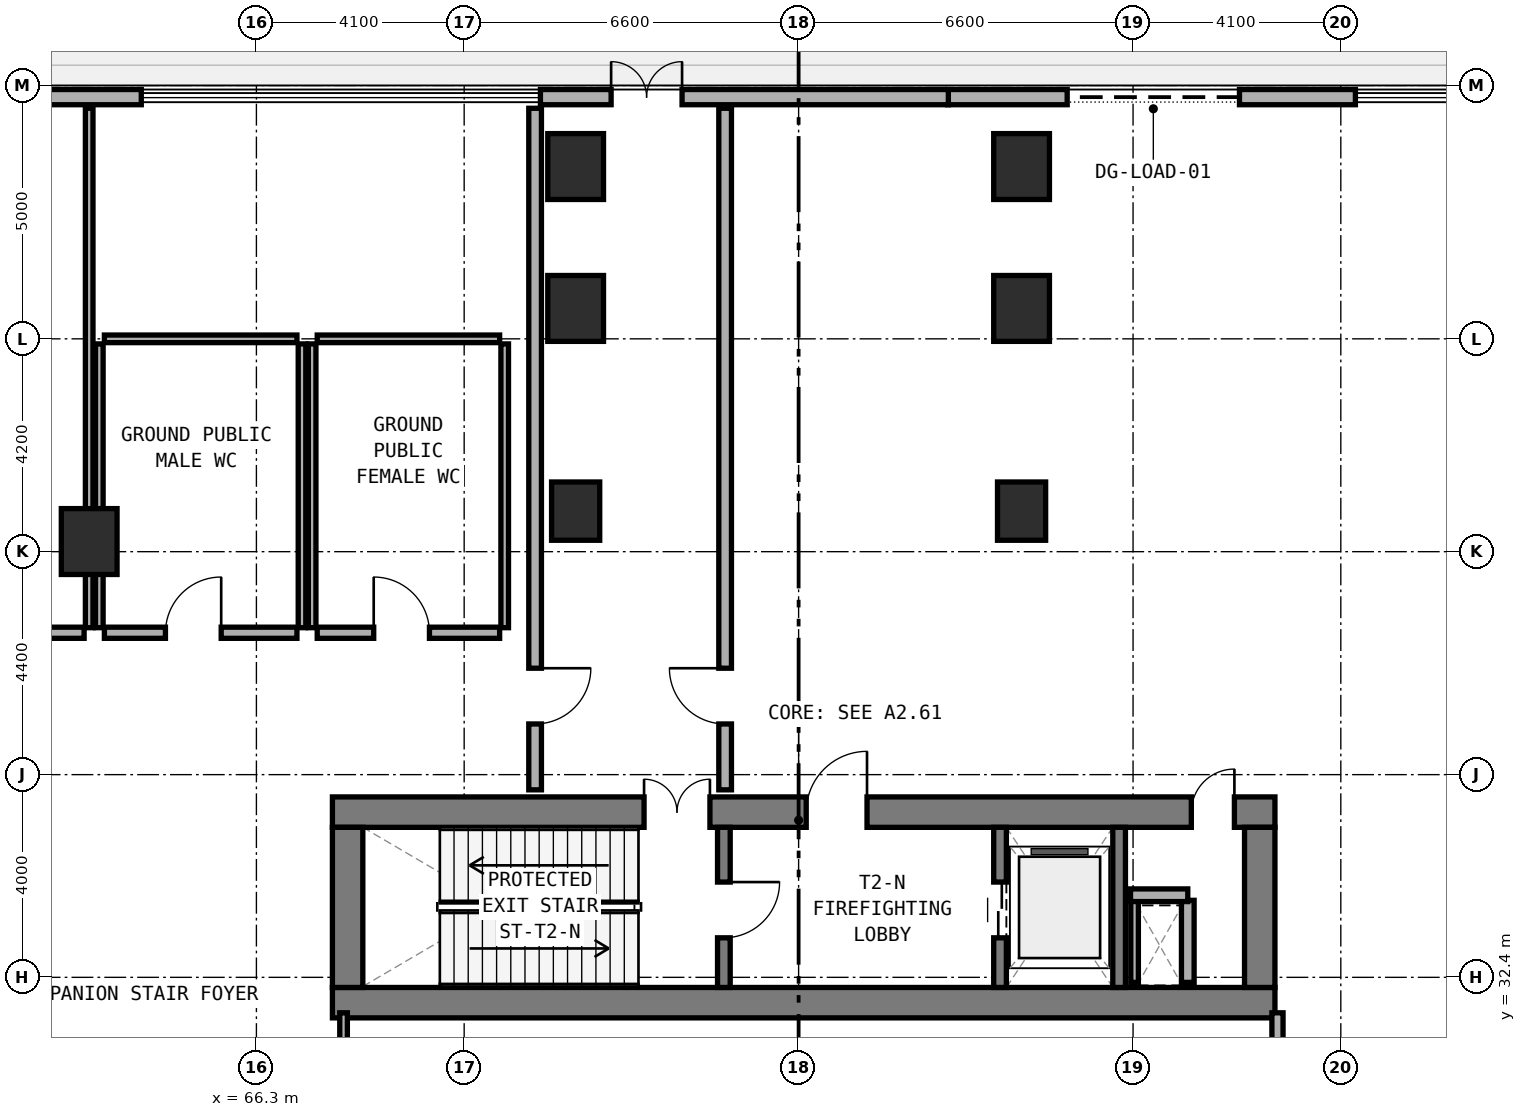
"""IFC4 building model, lengths in metres.
Left out: names, types, materials, properties, quantities, classifications, styles, units other than length and angle.
Written with IfcOpenShell. Run it as: python <this file> out.ifc"""

import sys

from ifc_helpers import new_model, si_unit, direction, frame, frame_2d, origin, origin_2d, place, context, subcontext, project, spatial, rectangle, extrude, element, fill, save


model = new_model("IFC4")
c1 = context("Model", 3, precision=1e-05, world=origin(), true_north=direction((0.0, 1.0)))
c2 = subcontext(c1, "Body", "Model", "MODEL_VIEW")
j1 = project(units=[si_unit("LENGTHUNIT", "METRE"), si_unit("PLANEANGLEUNIT", "RADIAN")], contexts=[c1])
p1 = place(None, origin())
s1 = spatial("IfcSite", under=j1, at=p1, CompositionType="ELEMENT")
p2 = place(p1, origin())
s2 = spatial("IfcBuilding", under=s1, at=p2, CompositionType="ELEMENT")
p3 = place(p2, origin())
s3 = spatial("IfcBuildingStorey", under=s2, at=p3, CompositionType="ELEMENT", Elevation=0.0)
p4 = place(p3, frame((67.8, 31.9, 0.0), z_axis=(0.0, 0.0, 1.0), x_axis=(1.0, 0.0, 0.0)))
e1 = element("IfcWall", 1, at=p4, inside=s3, PredefinedType="SHEAR", context=c2, shape_type="SweptSolid", body=[
    extrude(rectangle(XDim=18.6, YDim=0.6, at=frame_2d((9.3, 0.0))), origin(), (0.0, 0.0, 1.0), 5.4),
])
p5 = place(p3, frame((67.8, 35.66, 0.0), z_axis=(0.0, 0.0, 1.0), x_axis=(1.0, 0.0, 0.0)))
e2 = element("IfcWall", 2, at=p5, inside=s3, PredefinedType="SHEAR", context=c2, shape_type="SweptSolid", body=[
    extrude(rectangle(XDim=18.6, YDim=0.6, at=frame_2d((9.3, 0.0))), origin(), (0.0, 0.0, 1.0), 5.4),
])
p6 = place(p5, frame((9.35, 0.0, 0.0)))
e3 = element("IfcOpeningElement", 3, at=p6, cuts=e2, PredefinedType="OPENING", context=c2, shape_type="SweptSolid", body=[
    extrude(rectangle(XDim=1.2, YDim=2.15, at=frame_2d((0.6, 1.075))), frame((0.0, 0.31, 0.0), z_axis=(0.0, -1.0, 0.0), x_axis=(1.0, 0.0, 0.0)), (0.0, 0.0, 1.0), 0.62),
])
p7 = place(p5, frame((6.15, 0.0, 0.0)))
e4 = element("IfcOpeningElement", 4, at=p7, cuts=e2, PredefinedType="OPENING", context=c2, shape_type="SweptSolid", body=[
    extrude(rectangle(XDim=1.3, YDim=2.15, at=frame_2d((0.65, 1.075))), frame((0.0, 0.31, 0.0), z_axis=(0.0, -1.0, 0.0), x_axis=(1.0, 0.0, 0.0)), (0.0, 0.0, 1.0), 0.62),
])
p8 = place(p5, frame((16.95, 0.0, 0.0)))
e5 = element("IfcOpeningElement", 5, at=p8, cuts=e2, PredefinedType="OPENING", context=c2, shape_type="SweptSolid", body=[
    extrude(rectangle(XDim=0.85, YDim=2.1, at=frame_2d((0.425, 1.05))), frame((0.0, 0.31, 0.0), z_axis=(0.0, -1.0, 0.0), x_axis=(1.0, 0.0, 0.0)), (0.0, 0.0, 1.0), 0.62),
])
for number, where, z_axis, x_axis in (
    (6, (68.1, 32.2, 0.0), (0.0, 0.0, 1.0), (0.0, 1.0, 0.0)),
    (7, (86.1, 32.2, 0.0), (0.0, 0.0, 1.0), (0.0, 1.0, 0.0)),
):
    element("IfcWall", number, at=place(p3, frame(where, z_axis=z_axis, x_axis=x_axis)), inside=s3, PredefinedType="SHEAR", context=c2, shape_type="SweptSolid", body=[
        extrude(rectangle(XDim=3.16, YDim=0.6, at=frame_2d((1.58, 0.0))), origin(), (0.0, 0.0, 1.0), 5.4),
    ])
p9 = place(p3, frame((75.525, 32.2, 0.0), z_axis=(0.0, 0.0, 1.0), x_axis=(0.0, 1.0, 0.0)))
e8 = element("IfcWall", 8, at=p9, inside=s3, PredefinedType="STANDARD", context=c2, shape_type="SweptSolid", body=[
    extrude(rectangle(XDim=3.16, YDim=0.25, at=frame_2d((1.58, 0.0))), origin(), (0.0, 0.0, 1.0), 5.05),
])
p10 = place(p9, frame((0.98, 0.0, 0.0)))
e9 = element("IfcOpeningElement", 9, at=p10, cuts=e8, PredefinedType="OPENING", context=c2, shape_type="SweptSolid", body=[
    extrude(rectangle(XDim=1.1, YDim=2.15, at=frame_2d((0.55, 1.075))), frame((0.0, 0.135, 0.0), z_axis=(0.0, -1.0, 0.0), x_axis=(1.0, 0.0, 0.0)), (0.0, 0.0, 1.0), 0.27),
])
p11 = place(p3, frame((80.975, 32.2, 0.0), z_axis=(0.0, 0.0, 1.0), x_axis=(0.0, 1.0, 0.0)))
e10 = element("IfcWall", 10, at=p11, inside=s3, PredefinedType="STANDARD", context=c2, shape_type="SweptSolid", body=[
    extrude(rectangle(XDim=3.16, YDim=0.25, at=frame_2d((1.58, 0.0))), origin(), (0.0, 0.0, 1.0), 5.05),
])
p12 = place(p11, frame((0.98, 0.0, 0.0)))
e11 = element("IfcOpeningElement", 11, at=p12, cuts=e10, PredefinedType="OPENING", context=c2, shape_type="SweptSolid", body=[
    extrude(rectangle(XDim=1.1, YDim=2.15, at=frame_2d((0.55, 1.075))), frame((0.0, 0.135, 0.0), z_axis=(0.0, -1.0, 0.0), x_axis=(1.0, 0.0, 0.0)), (0.0, 0.0, 1.0), 0.27),
])
p13 = place(p3, frame((83.325, 32.2, 0.0), z_axis=(0.0, 0.0, 1.0), x_axis=(0.0, 1.0, 0.0)))
e12 = element("IfcWall", 12, at=p13, inside=s3, PredefinedType="STANDARD", context=c2, shape_type="SweptSolid", body=[
    extrude(rectangle(XDim=3.16, YDim=0.25, at=frame_2d((1.58, 0.0))), origin(), (0.0, 0.0, 1.0), 5.05),
])
for number, where, z_axis, x_axis in (
    (13, (72.6, 41.6, 0.0), (0.0, 0.0, 1.0), (1.0, 0.0, 0.0)),
    (14, (81.4, 41.6, 0.0), (0.0, 0.0, 1.0), (1.0, 0.0, 0.0)),
):
    element("IfcColumn", number, at=place(p3, frame(where, z_axis=z_axis, x_axis=x_axis)), inside=s3, PredefinedType="COLUMN", context=c2, shape_type="SweptSolid", body=[
        extrude(rectangle(XDim=0.95, YDim=1.15, at=origin_2d()), origin(), (0.0, 0.0, 1.0), 5.4),
    ])
for number, where, z_axis, x_axis in (
    (15, (63.0, 41.0, 0.0), (0.0, 0.0, 1.0), (1.0, 0.0, 0.0)),
    (16, (72.6, 48.4, 0.0), (0.0, 0.0, 1.0), (1.0, 0.0, 0.0)),
    (17, (81.4, 48.4, 0.0), (0.0, 0.0, 1.0), (1.0, 0.0, 0.0)),
    (18, (72.6, 45.6, 0.0), (0.0, 0.0, 1.0), (1.0, 0.0, 0.0)),
    (19, (81.4, 45.6, 0.0), (0.0, 0.0, 1.0), (1.0, 0.0, 0.0)),
):
    element("IfcColumn", number, at=place(p3, frame(where, z_axis=z_axis, x_axis=x_axis)), inside=s3, PredefinedType="COLUMN", context=c2, shape_type="SweptSolid", body=[
        extrude(rectangle(XDim=1.1, YDim=1.3, at=origin_2d()), origin(), (0.0, 0.0, 1.0), 5.4),
    ])
p14 = place(p3, frame((87.988, 49.77, 0.0), z_axis=(0.0, 0.0, 1.0), x_axis=(-1.0, 0.0, 0.0)))
e20 = element("IfcWall", 20, at=p14, inside=s3, PredefinedType="STANDARD", context=c2, shape_type="SweptSolid", body=[
    extrude(rectangle(XDim=8.049, YDim=0.3, at=frame_2d((4.024, 0.0))), origin(), (0.0, 0.0, 1.0), 5.05),
])
p15 = place(p14, frame((2.288, 0.0, 0.0)))
e21 = element("IfcOpeningElement", 21, at=p15, cuts=e20, PredefinedType="OPENING", context=c2, shape_type="SweptSolid", body=[
    extrude(rectangle(XDim=3.4, YDim=3.2, at=frame_2d((1.7, 1.6))), frame((0.0, 0.16, 0.0), z_axis=(0.0, -1.0, 0.0), x_axis=(1.0, 0.0, 0.0)), (0.0, 0.0, 1.0), 0.32),
])
p16 = place(p3, frame((79.955, 49.77, 0.0), z_axis=(0.0, 0.0, 1.0), x_axis=(-1.0, 0.0, 0.0)))
e22 = element("IfcWall", 22, at=p16, inside=s3, PredefinedType="STANDARD", context=c2, shape_type="SweptSolid", body=[
    extrude(rectangle(XDim=8.05, YDim=0.3, at=frame_2d((4.025, 0.0))), origin(), (0.0, 0.0, 1.0), 5.05),
])
p17 = place(p16, frame((5.255, 0.0, 0.0)))
e23 = element("IfcOpeningElement", 23, at=p17, cuts=e22, PredefinedType="OPENING", context=c2, shape_type="SweptSolid", body=[
    extrude(rectangle(XDim=1.4, YDim=2.2, at=frame_2d((0.7, 1.1))), frame((0.0, 0.16, 0.0), z_axis=(0.0, -1.0, 0.0), x_axis=(1.0, 0.0, 0.0)), (0.0, 0.0, 1.0), 0.32),
])
p18 = place(p3, frame((64.028, 49.77, 0.0), z_axis=(0.0, 0.0, 1.0), x_axis=(-1.0, 0.0, 0.0)))
e24 = element("IfcWall", 24, at=p18, inside=s3, PredefinedType="STANDARD", context=c2, shape_type="SweptSolid", body=[
    extrude(rectangle(XDim=8.049, YDim=0.3, at=frame_2d((4.024, 0.0))), origin(), (0.0, 0.0, 1.0), 5.05),
])
p19 = place(p18, frame((2.328, 0.0, 0.0)))
e25 = element("IfcOpeningElement", 25, at=p19, cuts=e24, PredefinedType="OPENING", context=c2, shape_type="SweptSolid", body=[
    extrude(rectangle(XDim=3.4, YDim=3.2, at=frame_2d((1.7, 1.6))), frame((0.0, 0.16, 0.0), z_axis=(0.0, -1.0, 0.0), x_axis=(1.0, 0.0, 0.0)), (0.0, 0.0, 1.0), 0.32),
])
p20 = place(p3, frame((83.63, 32.3, 0.0), z_axis=(0.0, 0.0, 1.0), x_axis=(0.0, 1.0, 0.0)))
e26 = element("IfcWall", 26, at=p20, inside=s3, PredefinedType="PARTITIONING", context=c2, shape_type="SweptSolid", body=[
    extrude(rectangle(XDim=1.62, YDim=0.15, at=frame_2d((0.81, 0.0))), origin(), (0.0, 0.0, 1.0), 4.525),
])
p21 = place(p3, frame((84.68, 32.3, 0.0), z_axis=(0.0, 0.0, 1.0), x_axis=(0.0, 1.0, 0.0)))
e27 = element("IfcWall", 27, at=p21, inside=s3, PredefinedType="SOLIDWALL", context=c2, shape_type="SweptSolid", body=[
    extrude(rectangle(XDim=1.62, YDim=0.25, at=frame_2d((0.81, 0.0))), origin(), (0.0, 0.0, 1.0), 5.05),
])
p22 = place(p3, frame((83.55, 34.02, 0.0), z_axis=(0.0, 0.0, 1.0), x_axis=(1.0, 0.0, 0.0)))
e28 = element("IfcWall", 28, at=p22, inside=s3, PredefinedType="SOLIDWALL", context=c2, shape_type="SweptSolid", body=[
    extrude(rectangle(XDim=1.13, YDim=0.25, at=frame_2d((0.565, 0.0))), origin(), (0.0, 0.0, 1.0), 5.05),
])
p23 = place(p3, frame((71.8, 36.1, 0.0), z_axis=(0.0, 0.0, 1.0), x_axis=(0.0, 1.0, 0.0)))
e29 = element("IfcWall", 29, at=p23, inside=s3, PredefinedType="SOLIDWALL", context=c2, shape_type="SweptSolid", body=[
    extrude(rectangle(XDim=13.45, YDim=0.25, at=frame_2d((6.725, 0.0))), origin(), (0.0, 0.0, 1.0), 4.225),
])
p24 = place(p23, frame((1.3, 0.0, 0.0)))
e30 = element("IfcOpeningElement", 30, at=p24, cuts=e29, PredefinedType="OPENING", context=c2, shape_type="SweptSolid", body=[
    extrude(rectangle(XDim=1.1, YDim=2.15, at=frame_2d((0.55, 1.075))), frame((0.0, 0.135, 0.0), z_axis=(0.0, -1.0, 0.0), x_axis=(1.0, 0.0, 0.0)), (0.0, 0.0, 1.0), 0.27),
])
p25 = place(p3, frame((75.55, 36.1, 0.0), z_axis=(0.0, 0.0, 1.0), x_axis=(0.0, 1.0, 0.0)))
e31 = element("IfcWall", 31, at=p25, inside=s3, PredefinedType="SOLIDWALL", context=c2, shape_type="SweptSolid", body=[
    extrude(rectangle(XDim=13.45, YDim=0.25, at=frame_2d((6.725, 0.0))), origin(), (0.0, 0.0, 1.0), 4.425),
])
p26 = place(p25, frame((1.3, 0.0, 0.0)))
e32 = element("IfcOpeningElement", 32, at=p26, cuts=e31, PredefinedType="OPENING", context=c2, shape_type="SweptSolid", body=[
    extrude(rectangle(XDim=1.1, YDim=2.15, at=frame_2d((0.55, 1.075))), frame((0.0, 0.135, 0.0), z_axis=(0.0, -1.0, 0.0), x_axis=(1.0, 0.0, 0.0)), (0.0, 0.0, 1.0), 0.27),
])
p27 = place(p3, frame((68.02, 18.3, 0.0), z_axis=(0.0, 0.0, 1.0), x_axis=(0.0, 1.0, 0.0)))
e33 = element("IfcWall", 33, at=p27, inside=s3, PredefinedType="PARTITIONING", context=c2, shape_type="SweptSolid", body=[
    extrude(rectangle(XDim=13.4, YDim=0.15, at=frame_2d((6.7, 0.0))), origin(), (0.0, 0.0, 1.0), 4.525),
])
p28 = place(p3, frame((86.45, 18.3, 0.0), z_axis=(0.0, 0.0, 1.0), x_axis=(0.0, 1.0, 0.0)))
e34 = element("IfcWall", 34, at=p28, inside=s3, PredefinedType="SOLIDWALL", context=c2, shape_type="SweptSolid", body=[
    extrude(rectangle(XDim=13.4, YDim=0.22, at=frame_2d((6.7, 0.0))), origin(), (0.0, 0.0, 1.0), 4.525),
])
p29 = place(p28, frame((5.525, 0.0, 0.0)))
e35 = element("IfcOpeningElement", 35, at=p29, cuts=e34, PredefinedType="OPENING", context=c2, shape_type="SweptSolid", body=[
    extrude(rectangle(XDim=1.1, YDim=2.1, at=frame_2d((0.55, 1.05))), frame((0.0, 0.12, 0.0), z_axis=(0.0, -1.0, 0.0), x_axis=(1.0, 0.0, 0.0)), (0.0, 0.0, 1.0), 0.24),
])
for number, where, z_axis, x_axis in (
    (36, (63.2, 39.3, 0.0), (0.0, 0.0, 1.0), (0.0, 1.0, 0.0)),
    (37, (67.2, 39.3, 0.0), (0.0, 0.0, 1.0), (0.0, 1.0, 0.0)),
):
    element("IfcWall", number, at=place(p3, frame(where, z_axis=z_axis, x_axis=x_axis)), inside=s3, PredefinedType="PARTITIONING", context=c2, shape_type="SweptSolid", body=[
        extrude(rectangle(XDim=5.6, YDim=0.15, at=frame_2d((2.8, 0.0))), origin(), (0.0, 0.0, 1.0), 4.665),
    ])
p30 = place(p3, frame((63.3, 45.0, 0.0), z_axis=(0.0, 0.0, 1.0), x_axis=(1.0, 0.0, 0.0)))
e38 = element("IfcWall", 38, at=p30, inside=s3, PredefinedType="PARTITIONING", context=c2, shape_type="SweptSolid", body=[
    extrude(rectangle(XDim=3.8, YDim=0.15, at=frame_2d((1.9, 0.0))), origin(), (0.0, 0.0, 1.0), 5.05),
])
p31 = place(p3, frame((63.3, 39.2, 0.0), z_axis=(0.0, 0.0, 1.0), x_axis=(1.0, 0.0, 0.0)))
e39 = element("IfcWall", 39, at=p31, inside=s3, PredefinedType="SOLIDWALL", context=c2, shape_type="SweptSolid", body=[
    extrude(rectangle(XDim=3.8, YDim=0.22, at=frame_2d((1.9, 0.0))), origin(), (0.0, 0.0, 1.0), 5.05),
])
p32 = place(p31, frame((1.205, 0.0, 0.0)))
e40 = element("IfcOpeningElement", 40, at=p32, cuts=e39, PredefinedType="OPENING", context=c2, shape_type="SweptSolid", body=[
    extrude(rectangle(XDim=1.1, YDim=2.1, at=frame_2d((0.55, 1.05))), frame((0.0, 0.12, 0.0), z_axis=(0.0, -1.0, 0.0), x_axis=(1.0, 0.0, 0.0)), (0.0, 0.0, 1.0), 0.24),
])
for number, where, z_axis, x_axis in (
    (41, (67.4, 39.3, 0.0), (0.0, 0.0, 1.0), (0.0, 1.0, 0.0)),
    (42, (71.2, 39.3, 0.0), (0.0, 0.0, 1.0), (0.0, 1.0, 0.0)),
):
    element("IfcWall", number, at=place(p3, frame(where, z_axis=z_axis, x_axis=x_axis)), inside=s3, PredefinedType="PARTITIONING", context=c2, shape_type="SweptSolid", body=[
        extrude(rectangle(XDim=5.6, YDim=0.15, at=frame_2d((2.8, 0.0))), origin(), (0.0, 0.0, 1.0), 4.665),
    ])
p33 = place(p3, frame((67.5, 45.0, 0.0), z_axis=(0.0, 0.0, 1.0), x_axis=(1.0, 0.0, 0.0)))
e43 = element("IfcWall", 43, at=p33, inside=s3, PredefinedType="PARTITIONING", context=c2, shape_type="SweptSolid", body=[
    extrude(rectangle(XDim=3.6, YDim=0.15, at=frame_2d((1.8, 0.0))), origin(), (0.0, 0.0, 1.0), 5.05),
])
p34 = place(p3, frame((67.5, 39.2, 0.0), z_axis=(0.0, 0.0, 1.0), x_axis=(1.0, 0.0, 0.0)))
e44 = element("IfcWall", 44, at=p34, inside=s3, PredefinedType="SOLIDWALL", context=c2, shape_type="SweptSolid", body=[
    extrude(rectangle(XDim=3.6, YDim=0.22, at=frame_2d((1.8, 0.0))), origin(), (0.0, 0.0, 1.0), 5.05),
])
p35 = place(p34, frame((1.115, 0.0, 0.0)))
e45 = element("IfcOpeningElement", 45, at=p35, cuts=e44, PredefinedType="OPENING", context=c2, shape_type="SweptSolid", body=[
    extrude(rectangle(XDim=1.1, YDim=2.1, at=frame_2d((0.55, 1.05))), frame((0.0, 0.12, 0.0), z_axis=(0.0, -1.0, 0.0), x_axis=(1.0, 0.0, 0.0)), (0.0, 0.0, 1.0), 0.24),
])
p36 = place(p3, frame((63.0, 39.3, 0.0), z_axis=(0.0, 0.0, 1.0), x_axis=(0.0, 1.0, 0.0)))
e46 = element("IfcWall", 46, at=p36, inside=s3, PredefinedType="PARTITIONING", context=c2, shape_type="SweptSolid", body=[
    extrude(rectangle(XDim=10.25, YDim=0.15, at=frame_2d((5.125, 0.0))), origin(), (0.0, 0.0, 1.0), 4.225),
])
p37 = place(p3, frame((30.5, 39.2, 0.0), z_axis=(0.0, 0.0, 1.0), x_axis=(1.0, 0.0, 0.0)))
e47 = element("IfcWall", 47, at=p37, inside=s3, PredefinedType="SOLIDWALL", context=c2, shape_type="SweptSolid", body=[
    extrude(rectangle(XDim=32.4, YDim=0.22, at=frame_2d((16.2, 0.0))), origin(), (0.0, 0.0, 1.0), 4.325),
])
p38 = place(p37, frame((14.075, 0.0, 0.0)))
e48 = element("IfcOpeningElement", 48, at=p38, cuts=e47, PredefinedType="OPENING", context=c2, shape_type="SweptSolid", body=[
    extrude(rectangle(XDim=1.1, YDim=2.1, at=frame_2d((0.55, 1.05))), frame((0.0, 0.12, 0.0), z_axis=(0.0, -1.0, 0.0), x_axis=(1.0, 0.0, 0.0)), (0.0, 0.0, 1.0), 0.24),
])
p39 = place(p15, frame((3.4, 0.0, 0.0), z_axis=(0.0, 0.0, 1.0), x_axis=(-1.0, 0.0, 0.0)))
e49 = element("IfcDoor", 49, at=p39, inside=s3, OperationType="ROLLINGUP", PredefinedType="GATE", context=c2, shape_type="SweptSolid", body=[
    extrude(rectangle(XDim=3.4, YDim=3.2, at=frame_2d((1.7, 1.6))), frame((0.0, 0.025, 0.0), z_axis=(0.0, -1.0, 0.0), x_axis=(1.0, 0.0, 0.0)), (0.0, 0.0, 1.0), 0.05),
])
fill(e21, e49)
p40 = place(p17, frame((1.4, 0.0, 0.0), z_axis=(0.0, 0.0, 1.0), x_axis=(-1.0, 0.0, 0.0)))
e50 = element("IfcDoor", 50, at=p40, inside=s3, OperationType="DOUBLE_DOOR_SINGLE_SWING", PredefinedType="DOOR", context=c2, shape_type="SweptSolid", body=[
    extrude(rectangle(XDim=1.4, YDim=2.2, at=frame_2d((0.7, 1.1))), frame((0.0, 0.025, 0.0), z_axis=(0.0, -1.0, 0.0), x_axis=(1.0, 0.0, 0.0)), (0.0, 0.0, 1.0), 0.05),
])
fill(e23, e50)
p41 = place(p10, frame((1.1, 0.0, 0.0), z_axis=(0.0, 0.0, 1.0), x_axis=(-1.0, 0.0, 0.0)))
e51 = element("IfcDoor", 51, at=p41, inside=s3, OperationType="SINGLE_SWING_LEFT", PredefinedType="DOOR", context=c2, shape_type="SweptSolid", body=[
    extrude(rectangle(XDim=1.1, YDim=2.15, at=frame_2d((0.55, 1.075))), frame((0.0, 0.025, 0.0), z_axis=(0.0, -1.0, 0.0), x_axis=(1.0, 0.0, 0.0)), (0.0, 0.0, 1.0), 0.05),
])
fill(e9, e51)
p42 = place(p6, origin())
e52 = element("IfcDoor", 52, at=p42, inside=s3, OperationType="SINGLE_SWING_RIGHT", PredefinedType="DOOR", context=c2, shape_type="SweptSolid", body=[
    extrude(rectangle(XDim=1.2, YDim=2.15, at=frame_2d((0.6, 1.075))), frame((0.0, 0.025, 0.0), z_axis=(0.0, -1.0, 0.0), x_axis=(1.0, 0.0, 0.0)), (0.0, 0.0, 1.0), 0.05),
])
fill(e3, e52)
p43 = place(p7, origin())
e53 = element("IfcDoor", 53, at=p43, inside=s3, OperationType="DOUBLE_DOOR_SINGLE_SWING", PredefinedType="DOOR", context=c2, shape_type="SweptSolid", body=[
    extrude(rectangle(XDim=1.3, YDim=2.15, at=frame_2d((0.65, 1.075))), frame((0.0, 0.025, 0.0), z_axis=(0.0, -1.0, 0.0), x_axis=(1.0, 0.0, 0.0)), (0.0, 0.0, 1.0), 0.05),
])
fill(e4, e53)
p44 = place(p12, origin())
e54 = element("IfcDoor", 54, at=p44, inside=s3, OperationType="DOUBLE_DOOR_SLIDING", PredefinedType="DOOR", context=c2, shape_type="SweptSolid", body=[
    extrude(rectangle(XDim=1.1, YDim=2.15, at=frame_2d((0.55, 1.075))), frame((0.0, 0.025, 0.0), z_axis=(0.0, -1.0, 0.0), x_axis=(1.0, 0.0, 0.0)), (0.0, 0.0, 1.0), 0.05),
])
fill(e11, e54)
p45 = place(p8, origin())
e55 = element("IfcDoor", 55, at=p45, inside=s3, OperationType="SINGLE_SWING_RIGHT", PredefinedType="DOOR", context=c2, shape_type="SweptSolid", body=[
    extrude(rectangle(XDim=0.85, YDim=2.1, at=frame_2d((0.425, 1.05))), frame((0.0, 0.025, 0.0), z_axis=(0.0, -1.0, 0.0), x_axis=(1.0, 0.0, 0.0)), (0.0, 0.0, 1.0), 0.05),
])
fill(e5, e55)
p46 = place(p24, frame((1.1, 0.0, 0.0), z_axis=(0.0, 0.0, 1.0), x_axis=(-1.0, 0.0, 0.0)))
e56 = element("IfcDoor", 56, at=p46, inside=s3, OperationType="SINGLE_SWING_LEFT", PredefinedType="DOOR", context=c2, shape_type="SweptSolid", body=[
    extrude(rectangle(XDim=1.1, YDim=2.15, at=frame_2d((0.55, 1.075))), frame((0.0, 0.025, 0.0), z_axis=(0.0, -1.0, 0.0), x_axis=(1.0, 0.0, 0.0)), (0.0, 0.0, 1.0), 0.05),
])
fill(e30, e56)
p47 = place(p26, origin())
e57 = element("IfcDoor", 57, at=p47, inside=s3, OperationType="SINGLE_SWING_RIGHT", PredefinedType="DOOR", context=c2, shape_type="SweptSolid", body=[
    extrude(rectangle(XDim=1.1, YDim=2.15, at=frame_2d((0.55, 1.075))), frame((0.0, 0.025, 0.0), z_axis=(0.0, -1.0, 0.0), x_axis=(1.0, 0.0, 0.0)), (0.0, 0.0, 1.0), 0.05),
])
fill(e32, e57)
p48 = place(p32, origin())
e58 = element("IfcDoor", 58, at=p48, inside=s3, OperationType="SINGLE_SWING_RIGHT", PredefinedType="DOOR", context=c2, shape_type="SweptSolid", body=[
    extrude(rectangle(XDim=1.1, YDim=2.1, at=frame_2d((0.55, 1.05))), frame((0.0, 0.025, 0.0), z_axis=(0.0, -1.0, 0.0), x_axis=(1.0, 0.0, 0.0)), (0.0, 0.0, 1.0), 0.05),
])
fill(e40, e58)
p49 = place(p35, origin())
e59 = element("IfcDoor", 59, at=p49, inside=s3, OperationType="SINGLE_SWING_LEFT", PredefinedType="DOOR", context=c2, shape_type="SweptSolid", body=[
    extrude(rectangle(XDim=1.1, YDim=2.1, at=frame_2d((0.55, 1.05))), frame((0.0, 0.025, 0.0), z_axis=(0.0, -1.0, 0.0), x_axis=(1.0, 0.0, 0.0)), (0.0, 0.0, 1.0), 0.05),
])
fill(e45, e59)
save(model, sys.argv[1])
